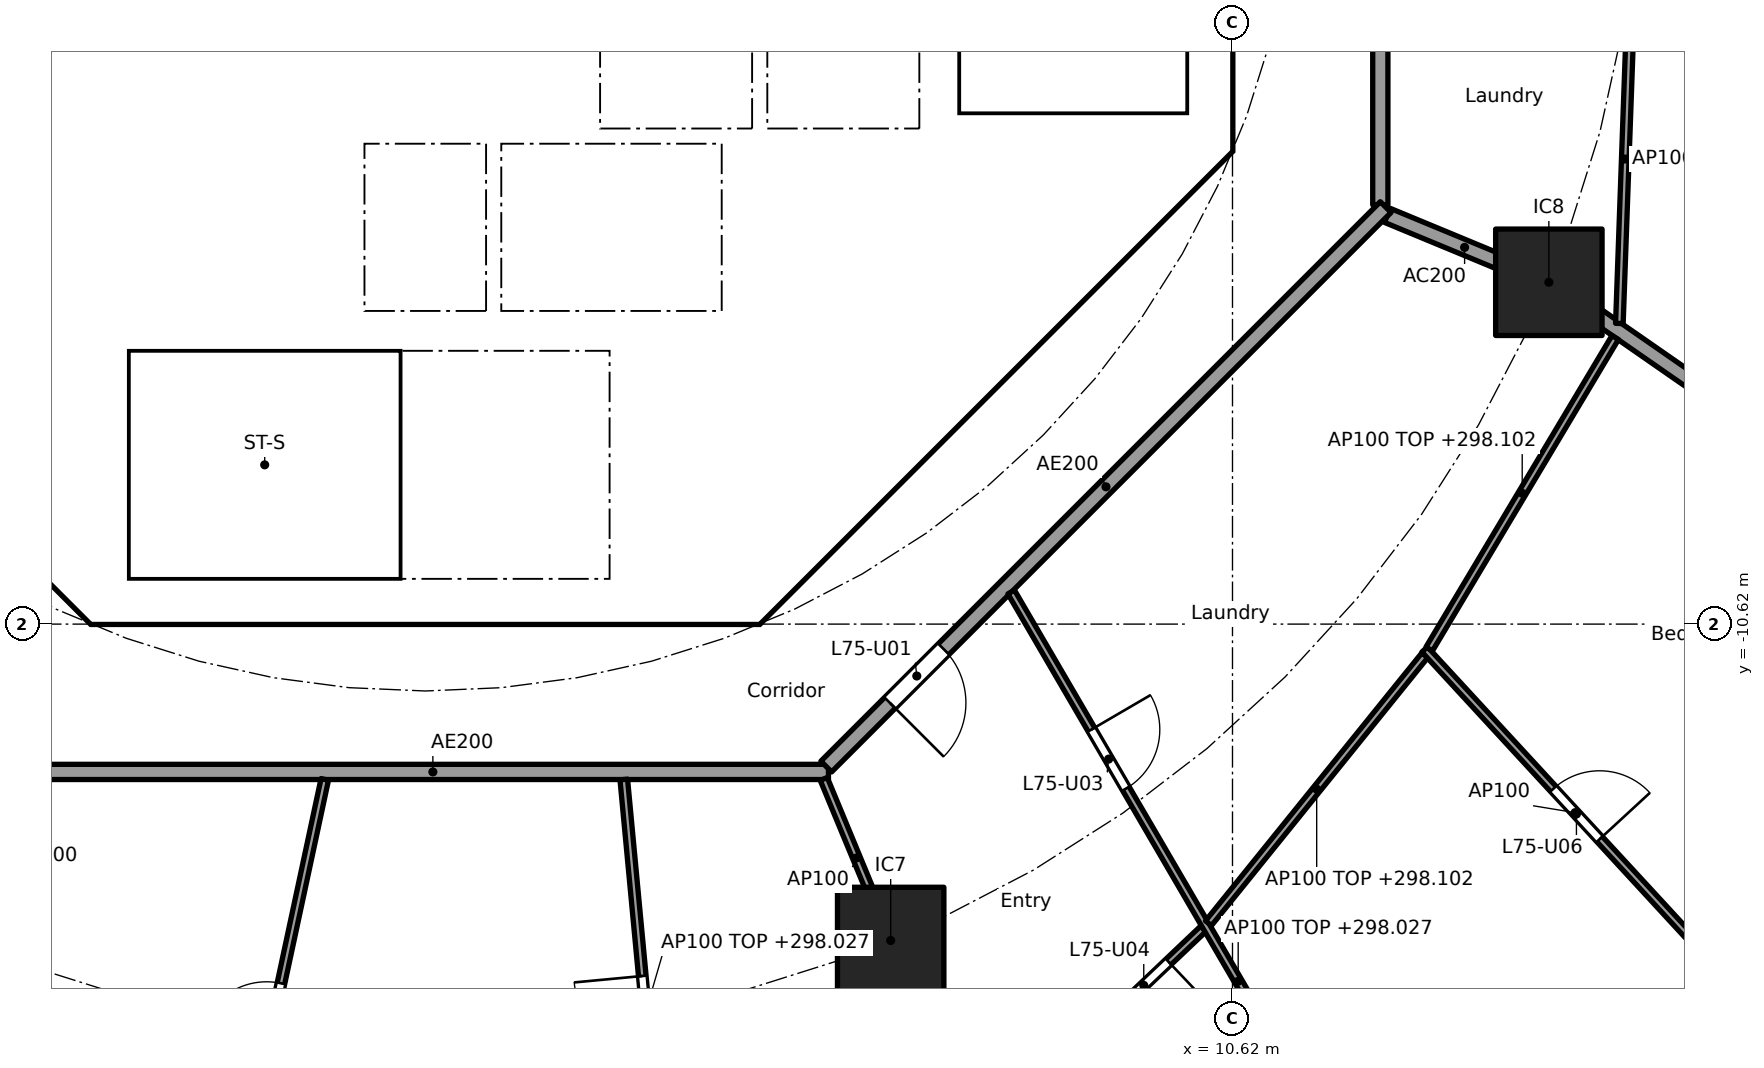
"""IFC4 building model, lengths in metres.
Left out: names, types, materials, properties, quantities, classifications, styles, units other than length and angle.
Written with IfcOpenShell. Run it as: python <this file> out.ifc"""

import sys

from ifc_helpers import new_model, si_unit, direction, frame, frame_2d, origin, origin_2d, place, context, subcontext, project, spatial, polyline, rectangle, outline, extrude, element, fill, save


model = new_model("IFC4")
c1 = context("Model", 3, precision=1e-05, world=origin(), true_north=direction((0.0, 1.0)))
c2 = subcontext(c1, "Body", "Model", "MODEL_VIEW")
j1 = project(units=[si_unit("LENGTHUNIT", "METRE"), si_unit("PLANEANGLEUNIT", "RADIAN")], contexts=[c1])
p1 = place(None, origin())
s1 = spatial("IfcSite", under=j1, at=p1, CompositionType="ELEMENT")
p2 = place(p1, origin())
s2 = spatial("IfcBuilding", under=s1, at=p2, CompositionType="ELEMENT")
p3 = place(p2, frame((0.0, 0.0, 295.5)))
s3 = spatial("IfcBuildingStorey", under=s2, at=p3, CompositionType="ELEMENT", Elevation=295.5)
for number, where, z_axis, x_axis in (
    (1, (6.123, -14.782, 0.0), (0.0, 0.0, 1.0), (1.0, 0.0, 0.0)),
    (2, (14.782, -6.123, 0.0), (0.0, 0.0, 1.0), (1.0, 0.0, 0.0)),
):
    element("IfcColumn", number, at=place(p3, frame(where, z_axis=z_axis, x_axis=x_axis)), inside=s3, PredefinedType="COLUMN", context=c2, shape_type="SweptSolid", body=[
        extrude(rectangle(XDim=1.4, YDim=1.4, at=origin_2d()), origin(), (0.0, 0.0, 1.0), 3.7),
    ])
p4 = place(p3, frame((-9.988, -4.613, 0.0), z_axis=(0.0, 0.0, 1.0), x_axis=(0.707106781187, -0.707106781187, 0.0)))
e3 = element("IfcWall", 3, at=p4, inside=s3, PredefinedType="SHEAR", context=c2, shape_type="SweptSolid", body=[
    extrude(rectangle(XDim=7.602, YDim=0.6, at=frame_2d((3.801, 0.0))), origin(), (0.0, 0.0, 1.0), 3.28),
])
p5 = place(p4, frame((6.151, 0.0, 0.0)))
e4 = element("IfcOpeningElement", 4, at=p5, cuts=e3, PredefinedType="OPENING", context=c2, shape_type="SweptSolid", body=[
    extrude(rectangle(XDim=1.1, YDim=2.1, at=frame_2d((0.55, 1.05))), frame((0.0, 0.31, 0.0), z_axis=(0.0, -1.0, 0.0), x_axis=(1.0, 0.0, 0.0)), (0.0, 0.0, 1.0), 0.62),
])
p6 = place(p3, frame((4.613, -9.988, 0.0), z_axis=(0.0, 0.0, 1.0), x_axis=(0.707106781187, 0.707106781187, 0.0)))
e5 = element("IfcWall", 5, at=p6, inside=s3, PredefinedType="SHEAR", context=c2, shape_type="SweptSolid", body=[
    extrude(rectangle(XDim=7.602, YDim=0.6, at=frame_2d((3.801, 0.0))), origin(), (0.0, 0.0, 1.0), 3.28),
])
p7 = place(p6, frame((3.201, 0.0, 0.0)))
e6 = element("IfcOpeningElement", 6, at=p7, cuts=e5, PredefinedType="OPENING", context=c2, shape_type="SweptSolid", body=[
    extrude(rectangle(XDim=1.2, YDim=2.1, at=frame_2d((0.6, 1.05))), frame((0.0, 0.31, 0.0), z_axis=(0.0, -1.0, 0.0), x_axis=(1.0, 0.0, 0.0)), (0.0, 0.0, 1.0), 0.62),
])
p8 = place(p3, frame((4.0, -10.025, 0.0), z_axis=(0.0, 0.0, 1.0), x_axis=(0.0, 1.0, 0.0)))
e7 = element("IfcWall", 7, at=p8, inside=s3, PredefinedType="SOLIDWALL", context=c2, shape_type="SweptSolid", body=[
    extrude(rectangle(XDim=3.0, YDim=0.2, at=frame_2d((1.5, 0.0))), origin(), (0.0, 0.0, 1.0), 3.28),
])
p9 = place(p8, frame((0.975, 0.0, 0.0)))
e8 = element("IfcOpeningElement", 8, at=p9, cuts=e7, PredefinedType="OPENING", context=c2, shape_type="SweptSolid", body=[
    extrude(rectangle(XDim=1.1, YDim=2.1, at=frame_2d((0.55, 1.05))), frame((0.0, 0.11, 0.0), z_axis=(0.0, -1.0, 0.0), x_axis=(1.0, 0.0, 0.0)), (0.0, 0.0, 1.0), 0.22),
])
p10 = place(p3, frame((4.0, -6.5, 0.0), z_axis=(0.0, 0.0, 1.0), x_axis=(0.0, 1.0, 0.0)))
e9 = element("IfcWall", 9, at=p10, inside=s3, PredefinedType="SOLIDWALL", context=c2, shape_type="SweptSolid", body=[
    extrude(rectangle(XDim=2.2, YDim=0.2, at=frame_2d((1.1, 0.0))), origin(), (0.0, 0.0, 1.0), 3.28),
])
p11 = place(p10, frame((0.55, 0.0, 0.0)))
e10 = element("IfcOpeningElement", 10, at=p11, cuts=e9, PredefinedType="OPENING", context=c2, shape_type="SweptSolid", body=[
    extrude(rectangle(XDim=1.1, YDim=2.1, at=frame_2d((0.55, 1.05))), frame((0.0, 0.11, 0.0), z_axis=(0.0, -1.0, 0.0), x_axis=(1.0, 0.0, 0.0)), (0.0, 0.0, 1.0), 0.22),
])
p12 = place(p3, frame((-4.0, -6.5, 0.0), z_axis=(0.0, 0.0, 1.0), x_axis=(0.0, 1.0, 0.0)))
e11 = element("IfcWall", 11, at=p12, inside=s3, PredefinedType="SOLIDWALL", context=c2, shape_type="SweptSolid", body=[
    extrude(rectangle(XDim=2.2, YDim=0.2, at=frame_2d((1.1, 0.0))), origin(), (0.0, 0.0, 1.0), 3.28),
])
p13 = place(p12, frame((0.65, 0.0, 0.0)))
e12 = element("IfcOpeningElement", 12, at=p13, cuts=e11, PredefinedType="OPENING", context=c2, shape_type="SweptSolid", body=[
    extrude(rectangle(XDim=0.9, YDim=2.1, at=frame_2d((0.45, 1.05))), frame((0.0, 0.11, 0.0), z_axis=(0.0, -1.0, 0.0), x_axis=(1.0, 0.0, 0.0)), (0.0, 0.0, 1.0), 0.22),
])
p14 = place(p3, origin())
e13 = element("IfcWall", 13, at=p14, inside=s3, PredefinedType="SHEAR", context=c2, shape_type="SweptSolid", body=[
    extrude(outline(polyline([(-4.152, -10.025), (4.152, -10.025), (4.401, -9.776), (4.825, -10.2), (4.401, -10.625), (-4.401, -10.625), (-4.825, -10.2), (-4.401, -9.776), (-4.152, -10.025)])), origin(), (0.0, 0.0, 1.0), 3.28),
])
p15 = place(p3, origin())
e14 = element("IfcWall", 14, at=p15, inside=s3, PredefinedType="SHEAR", context=c2, shape_type="SweptSolid", body=[
    extrude(outline(polyline([(9.776, -4.401), (10.025, -4.152), (10.025, -3.801), (10.025, 4.152), (9.776, 4.401), (10.2, 4.825), (10.625, 4.401), (10.625, -4.401), (10.2, -4.825), (9.776, -4.401)])), origin(), (0.0, 0.0, 1.0), 3.28),
])
for number, where, z_axis, x_axis in (
    (15, (-0.9, -6.5, 0.0), (0.0, 0.0, 1.0), (0.0, 1.0, 0.0)),
    (16, (0.9, -6.5, 0.0), (0.0, 0.0, 1.0), (0.0, 1.0, 0.0)),
):
    element("IfcWall", number, at=place(p3, frame(where, z_axis=z_axis, x_axis=x_axis)), inside=s3, PredefinedType="SOLIDWALL", context=c2, shape_type="SweptSolid", body=[
        extrude(rectangle(XDim=2.2, YDim=0.2, at=frame_2d((1.1, 0.0))), origin(), (0.0, 0.0, 1.0), 3.28),
    ])
p16 = place(p3, origin())
e17 = element("IfcWall", 17, at=p16, inside=s3, PredefinedType="SOLIDWALL", context=c2, shape_type="SweptSolid", body=[
    extrude(outline(polyline([(-6.7, -2.1), (-6.5, -2.1), (-6.5, -4.1), (-4.5, -4.1), (-4.5, -2.1), (-4.3, -2.1), (-4.3, -4.1), (-2.3, -4.1), (-2.3, -2.1), (-2.1, -2.1), (-2.1, -4.1), (2.1, -4.1), (2.1, -2.1), (2.3, -2.1), (2.3, -4.1), (4.3, -4.1), (4.3, -2.1), (4.5, -2.1), (4.5, -4.1), (6.5, -4.1), (6.5, -2.1), (6.7, -2.1), (6.7, -4.3), (-6.7, -4.3), (-6.7, -2.1)])), origin(), (0.0, 0.0, 1.0), 3.28),
])
p17 = place(p3, origin())
e18 = element("IfcWall", 18, at=p17, inside=s3, PredefinedType="SOLIDWALL", context=c2, shape_type="SweptSolid", body=[
    extrude(outline(polyline([(-3.9, -10.025), (-4.1, -10.025), (-4.1, -7.025), (-3.9, -7.025), (-3.9, -10.025)])), origin(), (0.0, 0.0, 1.0), 3.28),
])
p18 = place(p3, origin())
e19 = element("IfcWall", 19, at=p18, inside=s3, PredefinedType="SOLIDWALL", context=c2, shape_type="SweptSolid", body=[
    extrude(outline(polyline([(4.1, -7.025), (-4.1, -7.025), (-4.1, -6.5), (4.1, -6.5), (4.1, -7.025)])), origin(), (0.0, 0.0, 1.0), 3.28),
])
p19 = place(p3, origin())
e20 = element("IfcWall", 20, at=p19, inside=s3, PredefinedType="SOLIDWALL", context=c2, shape_type="SweptSolid", body=[
    extrude(outline(polyline([(7.025, -3.9), (6.7, -3.9), (6.7, 3.9), (7.025, 3.9), (7.025, -3.9)])), origin(), (0.0, 0.0, 1.0), 3.28),
])
p20 = place(p3, origin())
e21 = element("IfcWall", 21, at=p20, inside=s3, PredefinedType="SOLIDWALL", context=c2, shape_type="SweptSolid", body=[
    extrude(outline(polyline([(10.025, -4.1), (6.7, -4.1), (6.7, -3.9), (10.025, -3.9), (10.025, -4.1)])), origin(), (0.0, 0.0, 1.0), 3.28),
])
p21 = place(p3, frame((12.657, -5.243, 0.0), z_axis=(0.0, 0.0, 1.0), x_axis=(0.92383017907, -0.382802560388, 0.0)))
e22 = element("IfcWall", 22, at=p21, inside=s3, PredefinedType="PARTITIONING", context=c2, shape_type="SweptSolid", body=[
    extrude(rectangle(XDim=2.2, YDim=0.2, at=frame_2d((1.1, 0.0))), origin(), (0.0, 0.0, 1.0), 3.28),
])
p22 = place(p3, frame((14.823, -6.151, 0.0), z_axis=(0.0, 0.0, 1.0), x_axis=(0.821435065081, -0.570302054928, 0.0)))
e23 = element("IfcWall", 23, at=p22, inside=s3, PredefinedType="PARTITIONING", context=c2, shape_type="SweptSolid", body=[
    extrude(rectangle(XDim=5.368, YDim=0.2, at=frame_2d((2.684, 0.0))), origin(), (0.0, 0.0, 1.0), 3.28),
])
p23 = place(p3, frame((12.565, -5.104, 0.0), z_axis=(0.0, 0.0, 1.0), x_axis=(0.0, 1.0, 0.0)))
e24 = element("IfcWall", 24, at=p23, inside=s3, PredefinedType="PARTITIONING", context=c2, shape_type="SweptSolid", body=[
    extrude(rectangle(XDim=10.209, YDim=0.2, at=frame_2d((5.104, 0.0))), origin(), (0.0, 0.0, 1.0), 3.28),
])
p24 = place(p23, frame((4.604, 0.0, 0.0)))
e25 = element("IfcOpeningElement", 25, at=p24, cuts=e24, PredefinedType="OPENING", context=c2, shape_type="SweptSolid", body=[
    extrude(rectangle(XDim=1.0, YDim=2.1, at=frame_2d((0.5, 1.05))), frame((0.0, 0.11, 0.0), z_axis=(0.0, -1.0, 0.0), x_axis=(1.0, 0.0, 0.0)), (0.0, 0.0, 1.0), 0.22),
])
p25 = place(p3, frame((-5.104, -12.565, 0.0), z_axis=(0.0, 0.0, 1.0), x_axis=(1.0, 0.0, 0.0)))
e26 = element("IfcWall", 26, at=p25, inside=s3, PredefinedType="PARTITIONING", context=c2, shape_type="SweptSolid", body=[
    extrude(rectangle(XDim=10.409, YDim=0.2, at=frame_2d((5.205, 0.0))), origin(), (0.0, 0.0, 1.0), 3.28),
])
p26 = place(p3, frame((5.275, -12.494, 0.0), z_axis=(0.0, 0.0, 1.0), x_axis=(0.707106781187, 0.707106781187, 0.0)))
e27 = element("IfcWall", 27, at=p26, inside=s3, PredefinedType="PARTITIONING", context=c2, shape_type="SweptSolid", body=[
    extrude(rectangle(XDim=10.409, YDim=0.2, at=frame_2d((5.205, 0.0))), origin(), (0.0, 0.0, 1.0), 3.28),
])
p27 = place(p26, frame((1.185, 0.0, 0.0)))
e28 = element("IfcOpeningElement", 28, at=p27, cuts=e27, PredefinedType="OPENING", context=c2, shape_type="SweptSolid", body=[
    extrude(rectangle(XDim=1.0, YDim=2.1, at=frame_2d((0.5, 1.05))), frame((0.0, 0.11, 0.0), z_axis=(0.0, -1.0, 0.0), x_axis=(1.0, 0.0, 0.0)), (0.0, 0.0, 1.0), 0.22),
])
p28 = place(p3, frame((15.865, -2.338, 0.0), z_axis=(0.0, 0.0, 1.0), x_axis=(-0.035864509465, -0.999356661538, 0.0)))
e29 = element("IfcWall", 29, at=p28, inside=s3, PredefinedType="PARTITIONING", context=c2, shape_type="SweptSolid", body=[
    extrude(rectangle(XDim=4.329, YDim=0.1, at=frame_2d((2.165, 0.0))), origin(), (0.0, 0.0, 1.0), 2.602),
])
p29 = place(p3, frame((-1.322, -12.663, 0.0), z_axis=(0.0, 0.0, 1.0), x_axis=(-0.209957681159, -0.97771047459, 0.0)))
e30 = element("IfcWall", 30, at=p29, inside=s3, PredefinedType="PARTITIONING", context=c2, shape_type="SweptSolid", body=[
    extrude(rectangle(XDim=16.299, YDim=0.1, at=frame_2d((8.149, 0.0))), origin(), (0.0, 0.0, 1.0), 2.527),
])
p30 = place(p29, frame((2.744, 0.0, 0.0)))
e31 = element("IfcOpeningElement", 31, at=p30, cuts=e30, PredefinedType="OPENING", context=c2, shape_type="SweptSolid", body=[
    extrude(rectangle(XDim=0.9, YDim=2.1, at=frame_2d((0.45, 1.05))), frame((0.0, 0.06, 0.0), z_axis=(0.0, -1.0, 0.0), x_axis=(1.0, 0.0, 0.0)), (0.0, 0.0, 1.0), 0.12),
])
p31 = place(p3, frame((2.612, -12.664, 0.0), z_axis=(0.0, 0.0, 1.0), x_axis=(0.093781393779, -0.995592813444, 0.0)))
e32 = element("IfcWall", 32, at=p31, inside=s3, PredefinedType="PARTITIONING", context=c2, shape_type="SweptSolid", body=[
    extrude(rectangle(XDim=6.144, YDim=0.1, at=frame_2d((3.072, 0.0))), origin(), (0.0, 0.0, 1.0), 2.527),
])
p32 = place(p31, frame((2.597, 0.0, 0.0)))
e33 = element("IfcOpeningElement", 33, at=p32, cuts=e32, PredefinedType="OPENING", context=c2, shape_type="SweptSolid", body=[
    extrude(rectangle(XDim=0.9, YDim=2.1, at=frame_2d((0.45, 1.05))), frame((0.0, 0.06, 0.0), z_axis=(0.0, -1.0, 0.0), x_axis=(1.0, 0.0, 0.0)), (0.0, 0.0, 1.0), 0.12),
])
p33 = place(p3, frame((5.243, -12.657, 0.0), z_axis=(0.0, 0.0, 1.0), x_axis=(0.382719158442, -0.923864733477, 0.0)))
e34 = element("IfcWall", 34, at=p33, inside=s3, PredefinedType="PARTITIONING", context=c2, shape_type="SweptSolid", body=[
    extrude(rectangle(XDim=2.25, YDim=0.1, at=frame_2d((1.125, 0.0))), origin(), (0.0, 0.0, 1.0), 3.28),
])
p34 = place(p3, frame((6.138, -14.83, 0.0), z_axis=(0.0, 0.0, 1.0), x_axis=(0.303665801704, -0.952778610631, 0.0)))
e35 = element("IfcWall", 35, at=p34, inside=s3, PredefinedType="PARTITIONING", context=c2, shape_type="SweptSolid", body=[
    extrude(rectangle(XDim=2.922, YDim=0.1, at=frame_2d((1.461, 0.0))), origin(), (0.0, 0.0, 1.0), 3.28),
])
p35 = place(p34, frame((1.407, 0.0, 0.0)))
e36 = element("IfcOpeningElement", 36, at=p35, cuts=e35, PredefinedType="OPENING", context=c2, shape_type="SweptSolid", body=[
    extrude(rectangle(XDim=0.9, YDim=2.1, at=frame_2d((0.45, 1.05))), frame((0.0, 0.06, 0.0), z_axis=(0.0, -1.0, 0.0), x_axis=(1.0, 0.0, 0.0)), (0.0, 0.0, 1.0), 0.12),
])
p36 = place(p3, frame((7.004, -17.695, 0.0), z_axis=(0.0, 0.0, 1.0), x_axis=(0.725438442765, 0.68828705186, 0.0)))
e37 = element("IfcWall", 37, at=p36, inside=s3, PredefinedType="PARTITIONING", context=c2, shape_type="SweptSolid", body=[
    extrude(rectangle(XDim=4.456, YDim=0.1, at=frame_2d((2.228, 0.0))), origin(), (0.0, 0.0, 1.0), 2.602),
])
p37 = place(p36, frame((2.925, 0.0, 0.0)))
e38 = element("IfcOpeningElement", 38, at=p37, cuts=e37, PredefinedType="OPENING", context=c2, shape_type="SweptSolid", body=[
    extrude(rectangle(XDim=0.9, YDim=2.1, at=frame_2d((0.45, 1.05))), frame((0.0, 0.06, 0.0), z_axis=(0.0, -1.0, 0.0), x_axis=(1.0, 0.0, 0.0)), (0.0, 0.0, 1.0), 0.12),
])
p38 = place(p3, frame((7.708, -10.198, 0.0), z_axis=(0.0, 0.0, 1.0), x_axis=(0.503839015963, -0.863797572347, 0.0)))
e39 = element("IfcWall", 39, at=p38, inside=s3, PredefinedType="PARTITIONING", context=c2, shape_type="SweptSolid", body=[
    extrude(rectangle(XDim=11.856, YDim=0.1, at=frame_2d((5.928, 0.0))), origin(), (0.0, 0.0, 1.0), 2.527),
])
p39 = place(p38, frame((2.095, 0.0, 0.0)))
e40 = element("IfcOpeningElement", 40, at=p39, cuts=e39, PredefinedType="OPENING", context=c2, shape_type="SweptSolid", body=[
    extrude(rectangle(XDim=0.9, YDim=2.1, at=frame_2d((0.45, 1.05))), frame((0.0, 0.06, 0.0), z_axis=(0.0, -1.0, 0.0), x_axis=(1.0, 0.0, 0.0)), (0.0, 0.0, 1.0), 0.12),
])
p40 = place(p38, frame((8.023, 0.0, 0.0)))
e41 = element("IfcOpeningElement", 41, at=p40, cuts=e39, PredefinedType="OPENING", context=c2, shape_type="SweptSolid", body=[
    extrude(rectangle(XDim=0.9, YDim=2.1, at=frame_2d((0.45, 1.05))), frame((0.0, 0.06, 0.0), z_axis=(0.0, -1.0, 0.0), x_axis=(1.0, 0.0, 0.0)), (0.0, 0.0, 1.0), 0.12),
])
p41 = place(p3, frame((10.304, -14.555, 0.0), z_axis=(0.0, 0.0, 1.0), x_axis=(0.628170338674, 0.778075848237, 0.0)))
e42 = element("IfcWall", 42, at=p41, inside=s3, PredefinedType="PARTITIONING", context=c2, shape_type="SweptSolid", body=[
    extrude(rectangle(XDim=4.532, YDim=0.1, at=frame_2d((2.266, 0.0))), origin(), (0.0, 0.0, 1.0), 2.602),
])
p42 = place(p3, frame((13.149, -10.953, 0.0), z_axis=(0.0, 0.0, 1.0), x_axis=(0.677762562884, -0.735280836384, 0.0)))
e43 = element("IfcWall", 43, at=p42, inside=s3, PredefinedType="PARTITIONING", context=c2, shape_type="SweptSolid", body=[
    extrude(rectangle(XDim=5.841, YDim=0.1, at=frame_2d((2.92, 0.0))), origin(), (0.0, 0.0, 1.0), 3.28),
])
p43 = place(p42, frame((2.495, 0.0, 0.0)))
e44 = element("IfcOpeningElement", 44, at=p43, cuts=e43, PredefinedType="OPENING", context=c2, shape_type="SweptSolid", body=[
    extrude(rectangle(XDim=0.9, YDim=2.1, at=frame_2d((0.45, 1.05))), frame((0.0, 0.06, 0.0), z_axis=(0.0, -1.0, 0.0), x_axis=(1.0, 0.0, 0.0)), (0.0, 0.0, 1.0), 0.12),
])
p44 = place(p3, frame((13.208, -10.947, 0.0), z_axis=(0.0, 0.0, 1.0), x_axis=(0.512726452516, 0.858552028063, 0.0)))
e45 = element("IfcWall", 45, at=p44, inside=s3, PredefinedType="PARTITIONING", context=c2, shape_type="SweptSolid", body=[
    extrude(rectangle(XDim=4.772, YDim=0.1, at=frame_2d((2.386, 0.0))), origin(), (0.0, 0.0, 1.0), 2.602),
])
p45 = place(p11, origin())
e46 = element("IfcDoor", 46, at=p45, inside=s3, OperationType="DOUBLE_DOOR_SLIDING", PredefinedType="DOOR", context=c2, shape_type="SweptSolid", body=[
    extrude(rectangle(XDim=1.1, YDim=2.1, at=frame_2d((0.55, 1.05))), frame((0.0, 0.025, 0.0), z_axis=(0.0, -1.0, 0.0), x_axis=(1.0, 0.0, 0.0)), (0.0, 0.0, 1.0), 0.05),
])
fill(e10, e46)
p46 = place(p9, origin())
e47 = element("IfcDoor", 47, at=p46, inside=s3, OperationType="SINGLE_SWING_LEFT", PredefinedType="DOOR", context=c2, shape_type="SweptSolid", body=[
    extrude(rectangle(XDim=1.1, YDim=2.1, at=frame_2d((0.55, 1.05))), frame((0.0, 0.025, 0.0), z_axis=(0.0, -1.0, 0.0), x_axis=(1.0, 0.0, 0.0)), (0.0, 0.0, 1.0), 0.05),
])
fill(e8, e47)
p47 = place(p13, frame((0.9, 0.0, 0.0), x_axis=(-1.0, 0.0, 0.0)))
e48 = element("IfcDoor", 48, at=p47, inside=s3, OperationType="SINGLE_SWING_RIGHT", PredefinedType="DOOR", context=c2, shape_type="SweptSolid", body=[
    extrude(rectangle(XDim=0.9, YDim=2.1, at=frame_2d((0.45, 1.05))), frame((0.0, 0.025, 0.0), z_axis=(0.0, -1.0, 0.0), x_axis=(1.0, 0.0, 0.0)), (0.0, 0.0, 1.0), 0.05),
])
fill(e12, e48)
p48 = place(p7, origin())
e49 = element("IfcDoor", 49, at=p48, inside=s3, OperationType="SINGLE_SWING_RIGHT", PredefinedType="DOOR", context=c2, shape_type="SweptSolid", body=[
    extrude(rectangle(XDim=1.2, YDim=2.1, at=frame_2d((0.6, 1.05))), frame((0.0, 0.025, 0.0), z_axis=(0.0, -1.0, 0.0), x_axis=(1.0, 0.0, 0.0)), (0.0, 0.0, 1.0), 0.05),
])
fill(e6, e49)
p49 = place(p5, origin())
e50 = element("IfcDoor", 50, at=p49, inside=s3, OperationType="SINGLE_SWING_RIGHT", PredefinedType="DOOR", context=c2, shape_type="SweptSolid", body=[
    extrude(rectangle(XDim=1.1, YDim=2.1, at=frame_2d((0.55, 1.05))), frame((0.0, 0.025, 0.0), z_axis=(0.0, -1.0, 0.0), x_axis=(1.0, 0.0, 0.0)), (0.0, 0.0, 1.0), 0.05),
])
fill(e4, e50)
p50 = place(p27, frame((1.0, 0.0, 0.0), x_axis=(-1.0, 0.0, 0.0)))
e51 = element("IfcDoor", 51, at=p50, inside=s3, OperationType="SINGLE_SWING_RIGHT", PredefinedType="DOOR", context=c2, shape_type="SweptSolid", body=[
    extrude(rectangle(XDim=1.0, YDim=2.1, at=frame_2d((0.5, 1.05))), frame((0.0, 0.025, 0.0), z_axis=(0.0, -1.0, 0.0), x_axis=(1.0, 0.0, 0.0)), (0.0, 0.0, 1.0), 0.05),
])
fill(e28, e51)
p51 = place(p39, origin())
e52 = element("IfcDoor", 52, at=p51, inside=s3, OperationType="SINGLE_SWING_LEFT", PredefinedType="DOOR", context=c2, shape_type="SweptSolid", body=[
    extrude(rectangle(XDim=0.9, YDim=2.1, at=frame_2d((0.45, 1.05))), frame((0.0, 0.025, 0.0), z_axis=(0.0, -1.0, 0.0), x_axis=(1.0, 0.0, 0.0)), (0.0, 0.0, 1.0), 0.05),
])
fill(e40, e52)
p52 = place(p37, frame((0.9, 0.0, 0.0), x_axis=(-1.0, 0.0, 0.0)))
e53 = element("IfcDoor", 53, at=p52, inside=s3, OperationType="SINGLE_SWING_LEFT", PredefinedType="DOOR", context=c2, shape_type="SweptSolid", body=[
    extrude(rectangle(XDim=0.9, YDim=2.1, at=frame_2d((0.45, 1.05))), frame((0.0, 0.025, 0.0), z_axis=(0.0, -1.0, 0.0), x_axis=(1.0, 0.0, 0.0)), (0.0, 0.0, 1.0), 0.05),
])
fill(e38, e53)
p53 = place(p43, origin())
e54 = element("IfcDoor", 54, at=p53, inside=s3, OperationType="SINGLE_SWING_RIGHT", PredefinedType="DOOR", context=c2, shape_type="SweptSolid", body=[
    extrude(rectangle(XDim=0.9, YDim=2.1, at=frame_2d((0.45, 1.05))), frame((0.0, 0.025, 0.0), z_axis=(0.0, -1.0, 0.0), x_axis=(1.0, 0.0, 0.0)), (0.0, 0.0, 1.0), 0.05),
])
fill(e44, e54)
p54 = place(p32, frame((0.9, 0.0, 0.0), x_axis=(-1.0, 0.0, 0.0)))
e55 = element("IfcDoor", 55, at=p54, inside=s3, OperationType="SINGLE_SWING_RIGHT", PredefinedType="DOOR", context=c2, shape_type="SweptSolid", body=[
    extrude(rectangle(XDim=0.9, YDim=2.1, at=frame_2d((0.45, 1.05))), frame((0.0, 0.025, 0.0), z_axis=(0.0, -1.0, 0.0), x_axis=(1.0, 0.0, 0.0)), (0.0, 0.0, 1.0), 0.05),
])
fill(e33, e55)
p55 = place(p30, frame((0.9, 0.0, 0.0), x_axis=(-1.0, 0.0, 0.0)))
e56 = element("IfcDoor", 56, at=p55, inside=s3, OperationType="SINGLE_SWING_LEFT", PredefinedType="DOOR", context=c2, shape_type="SweptSolid", body=[
    extrude(rectangle(XDim=0.9, YDim=2.1, at=frame_2d((0.45, 1.05))), frame((0.0, 0.025, 0.0), z_axis=(0.0, -1.0, 0.0), x_axis=(1.0, 0.0, 0.0)), (0.0, 0.0, 1.0), 0.05),
])
fill(e31, e56)
save(model, sys.argv[1])
